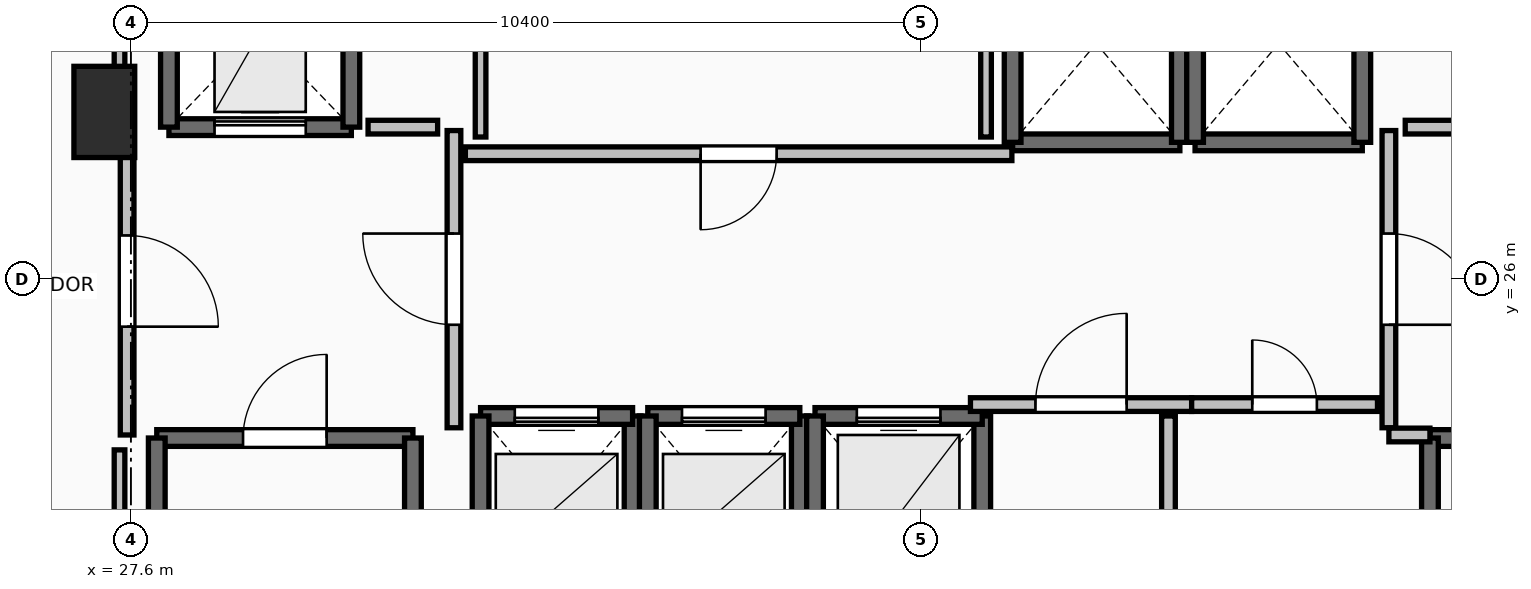
"""IFC4 building model, lengths in metres.
Left out: names, types, materials, properties, quantities, classifications, styles, units other than length and angle.
Written with IfcOpenShell. Run it as: python <this file> out.ifc"""

import sys

from ifc_helpers import new_model, si_unit, direction, frame, frame_2d, origin, origin_2d, place, context, subcontext, project, spatial, rectangle, extrude, element, fill, save


model = new_model("IFC4")
c1 = context("Model", 3, precision=1e-05, world=origin(), true_north=direction((0.0, 1.0)))
c2 = subcontext(c1, "Body", "Model", "MODEL_VIEW")
j1 = project(units=[si_unit("LENGTHUNIT", "METRE"), si_unit("PLANEANGLEUNIT", "RADIAN")], contexts=[c1])
p1 = place(None, origin())
s1 = spatial("IfcSite", under=j1, at=p1, CompositionType="ELEMENT")
p2 = place(p1, origin())
s2 = spatial("IfcBuilding", under=s1, at=p2, CompositionType="ELEMENT")
p3 = place(p2, frame((0.0, 0.0, 164.1)))
s3 = spatial("IfcBuildingStorey", under=s2, at=p3, CompositionType="ELEMENT", Elevation=164.1)
p4 = place(p3, frame((27.25, 28.2, 0.0), z_axis=(0.0, 0.0, 1.0), x_axis=(1.0, 0.0, 0.0)))
e1 = element("IfcColumn", 1, at=p4, inside=s3, PredefinedType="PILASTER", context=c2, shape_type="SweptSolid", body=[
    extrude(rectangle(XDim=0.8, YDim=1.2, at=origin_2d()), origin(), (0.0, 0.0, 1.0), 3.5),
])
p5 = place(p3, frame((27.94, 23.91, 0.0), z_axis=(0.0, 0.0, 1.0), x_axis=(1.0, 0.0, 0.0)))
e2 = element("IfcWall", 2, at=p5, inside=s3, PredefinedType="SOLIDWALL", context=c2, shape_type="SweptSolid", body=[
    extrude(rectangle(XDim=3.37, YDim=0.22, at=frame_2d((1.685, 0.0))), origin(), (0.0, 0.0, 1.0), 3.24),
])
p6 = place(p5, frame((1.135, 0.0, 0.0)))
e3 = element("IfcOpeningElement", 3, at=p6, cuts=e2, PredefinedType="OPENING", context=c2, shape_type="SweptSolid", body=[
    extrude(rectangle(XDim=1.1, YDim=2.15, at=frame_2d((0.55, 1.075))), frame((0.0, 0.125, 0.0), z_axis=(0.0, -1.0, 0.0), x_axis=(1.0, 0.0, 0.0)), (0.0, 0.0, 1.0), 0.25),
])
for number, where, z_axis, x_axis in (
    (4, (31.31, 23.91, 0.0), (0.0, 0.0, 1.0), (0.0, -1.0, 0.0)),
    (5, (27.94, 16.49, 0.0), (0.0, 0.0, 1.0), (0.0, 1.0, 0.0)),
):
    element("IfcWall", number, at=place(p3, frame(where, z_axis=z_axis, x_axis=x_axis)), inside=s3, PredefinedType="SOLIDWALL", context=c2, shape_type="SweptSolid", body=[
        extrude(rectangle(XDim=7.42, YDim=0.22, at=frame_2d((3.71, 0.0))), origin(), (0.0, 0.0, 1.0), 3.24),
    ])
p7 = place(p3, frame((44.69, 23.91, 0.0), z_axis=(0.0, 0.0, 1.0), x_axis=(1.0, 0.0, 0.0)))
e6 = element("IfcWall", 6, at=p7, inside=s3, PredefinedType="SOLIDWALL", context=c2, shape_type="SweptSolid", body=[
    extrude(rectangle(XDim=3.37, YDim=0.22, at=frame_2d((1.685, 0.0))), origin(), (0.0, 0.0, 1.0), 3.24),
])
p8 = place(p7, frame((1.135, 0.0, 0.0)))
e7 = element("IfcOpeningElement", 7, at=p8, cuts=e6, PredefinedType="OPENING", context=c2, shape_type="SweptSolid", body=[
    extrude(rectangle(XDim=1.1, YDim=2.15, at=frame_2d((0.55, 1.075))), frame((0.0, 0.125, 0.0), z_axis=(0.0, -1.0, 0.0), x_axis=(1.0, 0.0, 0.0)), (0.0, 0.0, 1.0), 0.25),
])
p9 = place(p3, frame((44.69, 16.49, 0.0), z_axis=(0.0, 0.0, 1.0), x_axis=(0.0, 1.0, 0.0)))
e8 = element("IfcWall", 8, at=p9, inside=s3, PredefinedType="SOLIDWALL", context=c2, shape_type="SweptSolid", body=[
    extrude(rectangle(XDim=7.42, YDim=0.22, at=frame_2d((3.71, 0.0))), origin(), (0.0, 0.0, 1.0), 3.24),
])
p10 = place(p3, frame((34.2, 21.8, 0.0), z_axis=(0.0, 0.0, 1.0), x_axis=(0.0, 1.0, 0.0)))
e9 = element("IfcWall", 9, at=p10, inside=s3, PredefinedType="SOLIDWALL", context=c2, shape_type="SweptSolid", body=[
    extrude(rectangle(XDim=2.4, YDim=0.22, at=frame_2d((1.2, 0.0))), origin(), (0.0, 0.0, 1.0), 3.24),
])
p11 = place(p3, frame((34.2, 24.2, 0.0), z_axis=(0.0, 0.0, 1.0), x_axis=(-1.0, 0.0, 0.0)))
e10 = element("IfcWall", 10, at=p11, inside=s3, PredefinedType="SOLIDWALL", context=c2, shape_type="SweptSolid", body=[
    extrude(rectangle(XDim=2.0, YDim=0.22, at=frame_2d((1.0, 0.0))), origin(), (0.0, 0.0, 1.0), 3.24),
])
p12 = place(p11, frame((0.45, 0.0, 0.0)))
e11 = element("IfcOpeningElement", 11, at=p12, cuts=e10, PredefinedType="OPENING", context=c2, shape_type="SweptSolid", body=[
    extrude(rectangle(XDim=1.1, YDim=2.2, at=frame_2d((0.55, 1.1))), frame((0.0, 0.125, 0.0), z_axis=(0.0, -1.0, 0.0), x_axis=(1.0, 0.0, 0.0)), (0.0, 0.0, 1.0), 0.25),
])
for number, where, z_axis, x_axis in (
    (12, (32.2, 24.2, 0.0), (0.0, 0.0, 1.0), (0.0, -1.0, 0.0)),
    (13, (36.4, 21.8, 0.0), (0.0, 0.0, 1.0), (0.0, 1.0, 0.0)),
):
    element("IfcWall", number, at=place(p3, frame(where, z_axis=z_axis, x_axis=x_axis)), inside=s3, PredefinedType="SOLIDWALL", context=c2, shape_type="SweptSolid", body=[
        extrude(rectangle(XDim=2.4, YDim=0.22, at=frame_2d((1.2, 0.0))), origin(), (0.0, 0.0, 1.0), 3.24),
    ])
p13 = place(p3, frame((36.4, 24.2, 0.0), z_axis=(0.0, 0.0, 1.0), x_axis=(-1.0, 0.0, 0.0)))
e14 = element("IfcWall", 14, at=p13, inside=s3, PredefinedType="SOLIDWALL", context=c2, shape_type="SweptSolid", body=[
    extrude(rectangle(XDim=2.0, YDim=0.22, at=frame_2d((1.0, 0.0))), origin(), (0.0, 0.0, 1.0), 3.24),
])
p14 = place(p13, frame((0.45, 0.0, 0.0)))
e15 = element("IfcOpeningElement", 15, at=p14, cuts=e14, PredefinedType="OPENING", context=c2, shape_type="SweptSolid", body=[
    extrude(rectangle(XDim=1.1, YDim=2.2, at=frame_2d((0.55, 1.1))), frame((0.0, 0.125, 0.0), z_axis=(0.0, -1.0, 0.0), x_axis=(1.0, 0.0, 0.0)), (0.0, 0.0, 1.0), 0.25),
])
p15 = place(p3, frame((34.4, 24.2, 0.0), z_axis=(0.0, 0.0, 1.0), x_axis=(0.0, -1.0, 0.0)))
e16 = element("IfcWall", 16, at=p15, inside=s3, PredefinedType="SOLIDWALL", context=c2, shape_type="SweptSolid", body=[
    extrude(rectangle(XDim=2.4, YDim=0.22, at=frame_2d((1.2, 0.0))), origin(), (0.0, 0.0, 1.0), 3.24),
])
p16 = place(p3, frame((38.8, 21.6, 0.0), z_axis=(0.0, 0.0, 1.0), x_axis=(0.0, 1.0, 0.0)))
e17 = element("IfcWall", 17, at=p16, inside=s3, PredefinedType="SOLIDWALL", context=c2, shape_type="SweptSolid", body=[
    extrude(rectangle(XDim=2.6, YDim=0.22, at=frame_2d((1.3, 0.0))), origin(), (0.0, 0.0, 1.0), 3.24),
])
p17 = place(p3, frame((38.8, 24.2, 0.0), z_axis=(0.0, 0.0, 1.0), x_axis=(-1.0, 0.0, 0.0)))
e18 = element("IfcWall", 18, at=p17, inside=s3, PredefinedType="SOLIDWALL", context=c2, shape_type="SweptSolid", body=[
    extrude(rectangle(XDim=2.2, YDim=0.22, at=frame_2d((1.1, 0.0))), origin(), (0.0, 0.0, 1.0), 3.24),
])
p18 = place(p17, frame((0.55, 0.0, 0.0)))
e19 = element("IfcOpeningElement", 19, at=p18, cuts=e18, PredefinedType="OPENING", context=c2, shape_type="SweptSolid", body=[
    extrude(rectangle(XDim=1.1, YDim=2.2, at=frame_2d((0.55, 1.1))), frame((0.0, 0.125, 0.0), z_axis=(0.0, -1.0, 0.0), x_axis=(1.0, 0.0, 0.0)), (0.0, 0.0, 1.0), 0.25),
])
p19 = place(p3, frame((36.6, 24.2, 0.0), z_axis=(0.0, 0.0, 1.0), x_axis=(0.0, -1.0, 0.0)))
e20 = element("IfcWall", 20, at=p19, inside=s3, PredefinedType="SOLIDWALL", context=c2, shape_type="SweptSolid", body=[
    extrude(rectangle(XDim=2.6, YDim=0.22, at=frame_2d((1.3, 0.0))), origin(), (0.0, 0.0, 1.0), 3.24),
])
p20 = place(p3, frame((39.2, 27.8, 0.0), z_axis=(0.0, 0.0, 1.0), x_axis=(1.0, 0.0, 0.0)))
e21 = element("IfcWall", 21, at=p20, inside=s3, PredefinedType="SOLIDWALL", context=c2, shape_type="SweptSolid", body=[
    extrude(rectangle(XDim=2.2, YDim=0.22, at=frame_2d((1.1, 0.0))), origin(), (0.0, 0.0, 1.0), 3.24),
])
for number, where, z_axis, x_axis in (
    (22, (41.4, 27.8, 0.0), (0.0, 0.0, 1.0), (0.0, 1.0, 0.0)),
    (23, (39.2, 30.4, 0.0), (0.0, 0.0, 1.0), (0.0, -1.0, 0.0)),
):
    element("IfcWall", number, at=place(p3, frame(where, z_axis=z_axis, x_axis=x_axis)), inside=s3, PredefinedType="SOLIDWALL", context=c2, shape_type="SweptSolid", body=[
        extrude(rectangle(XDim=2.6, YDim=0.22, at=frame_2d((1.3, 0.0))), origin(), (0.0, 0.0, 1.0), 3.24),
    ])
p21 = place(p3, frame((41.6, 27.8, 0.0), z_axis=(0.0, 0.0, 1.0), x_axis=(1.0, 0.0, 0.0)))
e24 = element("IfcWall", 24, at=p21, inside=s3, PredefinedType="SOLIDWALL", context=c2, shape_type="SweptSolid", body=[
    extrude(rectangle(XDim=2.2, YDim=0.22, at=frame_2d((1.1, 0.0))), origin(), (0.0, 0.0, 1.0), 3.24),
])
for number, where, z_axis, x_axis in (
    (25, (43.8, 27.8, 0.0), (0.0, 0.0, 1.0), (0.0, 1.0, 0.0)),
    (26, (41.6, 30.4, 0.0), (0.0, 0.0, 1.0), (0.0, -1.0, 0.0)),
):
    element("IfcWall", number, at=place(p3, frame(where, z_axis=z_axis, x_axis=x_axis)), inside=s3, PredefinedType="SOLIDWALL", context=c2, shape_type="SweptSolid", body=[
        extrude(rectangle(XDim=2.6, YDim=0.22, at=frame_2d((1.3, 0.0))), origin(), (0.0, 0.0, 1.0), 3.24),
    ])
p22 = place(p3, frame((28.1, 28.0, 0.0), z_axis=(0.0, 0.0, 1.0), x_axis=(1.0, 0.0, 0.0)))
e27 = element("IfcWall", 27, at=p22, inside=s3, PredefinedType="SHEAR", context=c2, shape_type="SweptSolid", body=[
    extrude(rectangle(XDim=2.4, YDim=0.22, at=frame_2d((1.2, 0.0))), origin(), (0.0, 0.0, 1.0), 3.24),
])
p23 = place(p22, frame((0.6, 0.0, 0.0)))
e28 = element("IfcOpeningElement", 28, at=p23, cuts=e27, PredefinedType="OPENING", context=c2, shape_type="SweptSolid", body=[
    extrude(rectangle(XDim=1.2, YDim=2.2, at=frame_2d((0.6, 1.1))), frame((0.0, 0.125, 0.0), z_axis=(0.0, -1.0, 0.0), x_axis=(1.0, 0.0, 0.0)), (0.0, 0.0, 1.0), 0.25),
])
for number, where, z_axis, x_axis in (
    (29, (30.5, 28.0, 0.0), (0.0, 0.0, 1.0), (0.0, 1.0, 0.0)),
    (30, (28.1, 30.5, 0.0), (0.0, 0.0, 1.0), (0.0, -1.0, 0.0)),
):
    element("IfcWall", number, at=place(p3, frame(where, z_axis=z_axis, x_axis=x_axis)), inside=s3, PredefinedType="SHEAR", context=c2, shape_type="SweptSolid", body=[
        extrude(rectangle(XDim=2.5, YDim=0.22, at=frame_2d((1.25, 0.0))), origin(), (0.0, 0.0, 1.0), 3.24),
    ])
p24 = place(p3, frame((31.85, 24.045, 0.0), z_axis=(0.0, 0.0, 1.0), x_axis=(0.0, 1.0, 0.0)))
e31 = element("IfcWall", 31, at=p24, inside=s3, PredefinedType="PARTITIONING", context=c2, shape_type="SweptSolid", body=[
    extrude(rectangle(XDim=3.91, YDim=0.18, at=frame_2d((1.955, 0.0))), origin(), (0.0, 0.0, 1.0), 3.24),
])
p25 = place(p24, frame((1.355, 0.0, 0.0)))
e32 = element("IfcOpeningElement", 32, at=p25, cuts=e31, PredefinedType="OPENING", context=c2, shape_type="SweptSolid", body=[
    extrude(rectangle(XDim=1.2, YDim=2.15, at=frame_2d((0.6, 1.075))), frame((0.0, 0.105, 0.0), z_axis=(0.0, -1.0, 0.0), x_axis=(1.0, 0.0, 0.0)), (0.0, 0.0, 1.0), 0.21),
])
p26 = place(p3, frame((27.55, 28.0, 0.0), z_axis=(0.0, 0.0, 1.0), x_axis=(0.0, -1.0, 0.0)))
e33 = element("IfcWall", 33, at=p26, inside=s3, PredefinedType="PARTITIONING", context=c2, shape_type="SweptSolid", body=[
    extrude(rectangle(XDim=4.05, YDim=0.18, at=frame_2d((2.025, 0.0))), origin(), (0.0, 0.0, 1.0), 3.24),
])
p27 = place(p26, frame((1.425, 0.0, 0.0)))
e34 = element("IfcOpeningElement", 34, at=p27, cuts=e33, PredefinedType="OPENING", context=c2, shape_type="SweptSolid", body=[
    extrude(rectangle(XDim=1.2, YDim=2.15, at=frame_2d((0.6, 1.075))), frame((0.0, 0.105, 0.0), z_axis=(0.0, -1.0, 0.0), x_axis=(1.0, 0.0, 0.0)), (0.0, 0.0, 1.0), 0.21),
])
p28 = place(p3, frame((44.15, 27.955, 0.0), z_axis=(0.0, 0.0, 1.0), x_axis=(0.0, -1.0, 0.0)))
e35 = element("IfcWall", 35, at=p28, inside=s3, PredefinedType="PARTITIONING", context=c2, shape_type="SweptSolid", body=[
    extrude(rectangle(XDim=3.91, YDim=0.18, at=frame_2d((1.955, 0.0))), origin(), (0.0, 0.0, 1.0), 3.24),
])
p29 = place(p28, frame((1.355, 0.0, 0.0)))
e36 = element("IfcOpeningElement", 36, at=p29, cuts=e35, PredefinedType="OPENING", context=c2, shape_type="SweptSolid", body=[
    extrude(rectangle(XDim=1.2, YDim=2.15, at=frame_2d((0.6, 1.075))), frame((0.0, 0.105, 0.0), z_axis=(0.0, -1.0, 0.0), x_axis=(1.0, 0.0, 0.0)), (0.0, 0.0, 1.0), 0.21),
])
p30 = place(p3, frame((44.15, 23.95, 0.0), z_axis=(0.0, 0.0, 1.0), x_axis=(1.0, 0.0, 0.0)))
e37 = element("IfcWall", 37, at=p30, inside=s3, PredefinedType="PARTITIONING", context=c2, shape_type="SweptSolid", body=[
    extrude(rectangle(XDim=0.54, YDim=0.18, at=frame_2d((0.27, 0.0))), origin(), (0.0, 0.0, 1.0), 3.24),
])
p31 = place(p3, frame((38.645, 24.35, 0.0), z_axis=(0.0, 0.0, 1.0), x_axis=(1.0, 0.0, 0.0)))
e38 = element("IfcWall", 38, at=p31, inside=s3, PredefinedType="PARTITIONING", context=c2, shape_type="SweptSolid", body=[
    extrude(rectangle(XDim=2.91, YDim=0.18, at=frame_2d((1.455, 0.0))), origin(), (0.0, 0.0, 1.0), 3.24),
])
p32 = place(p31, frame((0.855, 0.0, 0.0)))
e39 = element("IfcOpeningElement", 39, at=p32, cuts=e38, PredefinedType="OPENING", context=c2, shape_type="SweptSolid", body=[
    extrude(rectangle(XDim=1.2, YDim=2.15, at=frame_2d((0.6, 1.075))), frame((0.0, 0.105, 0.0), z_axis=(0.0, -1.0, 0.0), x_axis=(1.0, 0.0, 0.0)), (0.0, 0.0, 1.0), 0.21),
])
p33 = place(p3, frame((41.555, 24.35, 0.0), z_axis=(0.0, 0.0, 1.0), x_axis=(1.0, 0.0, 0.0)))
e40 = element("IfcWall", 40, at=p33, inside=s3, PredefinedType="PARTITIONING", context=c2, shape_type="SweptSolid", body=[
    extrude(rectangle(XDim=2.445, YDim=0.18, at=frame_2d((1.223, 0.0))), origin(), (0.0, 0.0, 1.0), 3.24),
])
p34 = place(p33, frame((0.798, 0.0, 0.0)))
e41 = element("IfcOpeningElement", 41, at=p34, cuts=e40, PredefinedType="OPENING", context=c2, shape_type="SweptSolid", body=[
    extrude(rectangle(XDim=0.85, YDim=2.1, at=frame_2d((0.425, 1.05))), frame((0.0, 0.105, 0.0), z_axis=(0.0, -1.0, 0.0), x_axis=(1.0, 0.0, 0.0)), (0.0, 0.0, 1.0), 0.21),
])
p35 = place(p3, frame((39.19, 27.65, 0.0), z_axis=(0.0, 0.0, 1.0), x_axis=(-1.0, 0.0, 0.0)))
e42 = element("IfcWall", 42, at=p35, inside=s3, PredefinedType="PARTITIONING", context=c2, shape_type="SweptSolid", body=[
    extrude(rectangle(XDim=7.19, YDim=0.18, at=frame_2d((3.595, 0.0))), origin(), (0.0, 0.0, 1.0), 3.24),
])
p36 = place(p35, frame((3.095, 0.0, 0.0)))
e43 = element("IfcOpeningElement", 43, at=p36, cuts=e42, PredefinedType="OPENING", context=c2, shape_type="SweptSolid", body=[
    extrude(rectangle(XDim=1.0, YDim=2.15, at=frame_2d((0.5, 1.075))), frame((0.0, 0.105, 0.0), z_axis=(0.0, -1.0, 0.0), x_axis=(1.0, 0.0, 0.0)), (0.0, 0.0, 1.0), 0.21),
])
p37 = place(p3, frame((41.25, 20.305, 0.0), z_axis=(0.0, 0.0, 1.0), x_axis=(0.0, 1.0, 0.0)))
e44 = element("IfcWall", 44, at=p37, inside=s3, PredefinedType="PARTITIONING", context=c2, shape_type="SweptSolid", body=[
    extrude(rectangle(XDim=3.895, YDim=0.18, at=frame_2d((1.948, 0.0))), origin(), (0.0, 0.0, 1.0), 3.24),
])
p38 = place(p37, frame((1.522, 0.0, 0.0)))
e45 = element("IfcOpeningElement", 45, at=p38, cuts=e44, PredefinedType="OPENING", context=c2, shape_type="SweptSolid", body=[
    extrude(rectangle(XDim=0.85, YDim=2.1, at=frame_2d((0.425, 1.05))), frame((0.0, 0.105, 0.0), z_axis=(0.0, -1.0, 0.0), x_axis=(1.0, 0.0, 0.0)), (0.0, 0.0, 1.0), 0.21),
])
for number, where, z_axis, x_axis in (
    (46, (31.635, 28.0, 0.0), (0.0, 0.0, 1.0), (-1.0, 0.0, 0.0)),
    (47, (45.28, 28.0, 0.0), (0.0, 0.0, 1.0), (-1.0, 0.0, 0.0)),
):
    element("IfcWall", number, at=place(p3, frame(where, z_axis=z_axis, x_axis=x_axis)), inside=s3, PredefinedType="PARTITIONING", context=c2, shape_type="SweptSolid", body=[
        extrude(rectangle(XDim=0.915, YDim=0.18, at=frame_2d((0.458, 0.0))), origin(), (0.0, 0.0, 1.0), 3.24),
    ])
for number, where, z_axis, x_axis in (
    (48, (32.2, 30.26, 0.0), (0.0, 0.0, 1.0), (0.0, -1.0, 0.0)),
    (49, (38.85, 27.87, 0.0), (0.0, 0.0, 1.0), (0.0, 1.0, 0.0)),
):
    element("IfcWall", number, at=place(p3, frame(where, z_axis=z_axis, x_axis=x_axis)), inside=s3, PredefinedType="PARTITIONING", context=c2, shape_type="SweptSolid", body=[
        extrude(rectangle(XDim=2.39, YDim=0.14, at=frame_2d((1.195, 0.0))), origin(), (0.0, 0.0, 1.0), 3.24),
    ])
p39 = place(p3, frame((27.45, 33.45, 0.0), z_axis=(0.0, 0.0, 1.0), x_axis=(0.0, -1.0, 0.0)))
e50 = element("IfcWall", 50, at=p39, inside=s3, PredefinedType="PARTITIONING", context=c2, shape_type="SweptSolid", body=[
    extrude(rectangle(XDim=5.254, YDim=0.14, at=frame_2d((2.627, 0.0))), origin(), (0.0, 0.0, 1.0), 2.432),
])
p40 = place(p3, frame((27.45, 23.754, 0.0), z_axis=(0.0, 0.0, 1.0), x_axis=(0.0, -1.0, 0.0)))
e51 = element("IfcWall", 51, at=p40, inside=s3, PredefinedType="PARTITIONING", context=c2, shape_type="SweptSolid", body=[
    extrude(rectangle(XDim=7.514, YDim=0.14, at=frame_2d((3.757, 0.0))), origin(), (0.0, 0.0, 1.0), 2.432),
])
p41 = place(p6, origin())
e52 = element("IfcDoor", 52, at=p41, inside=s3, OperationType="SINGLE_SWING_RIGHT", PredefinedType="DOOR", context=c2, shape_type="SweptSolid", body=[
    extrude(rectangle(XDim=1.1, YDim=2.15, at=frame_2d((0.55, 1.075))), frame((0.0, 0.025, 0.0), z_axis=(0.0, -1.0, 0.0), x_axis=(1.0, 0.0, 0.0)), (0.0, 0.0, 1.0), 0.05),
])
fill(e3, e52)
p42 = place(p12, origin())
e53 = element("IfcDoor", 53, at=p42, inside=s3, OperationType="SLIDING_TO_LEFT", PredefinedType="DOOR", context=c2, shape_type="SweptSolid", body=[
    extrude(rectangle(XDim=1.1, YDim=2.2, at=frame_2d((0.55, 1.1))), frame((0.0, 0.025, 0.0), z_axis=(0.0, -1.0, 0.0), x_axis=(1.0, 0.0, 0.0)), (0.0, 0.0, 1.0), 0.05),
])
fill(e11, e53)
p43 = place(p14, origin())
e54 = element("IfcDoor", 54, at=p43, inside=s3, OperationType="SLIDING_TO_LEFT", PredefinedType="DOOR", context=c2, shape_type="SweptSolid", body=[
    extrude(rectangle(XDim=1.1, YDim=2.2, at=frame_2d((0.55, 1.1))), frame((0.0, 0.025, 0.0), z_axis=(0.0, -1.0, 0.0), x_axis=(1.0, 0.0, 0.0)), (0.0, 0.0, 1.0), 0.05),
])
fill(e15, e54)
p44 = place(p18, origin())
e55 = element("IfcDoor", 55, at=p44, inside=s3, OperationType="SLIDING_TO_LEFT", PredefinedType="DOOR", context=c2, shape_type="SweptSolid", body=[
    extrude(rectangle(XDim=1.1, YDim=2.2, at=frame_2d((0.55, 1.1))), frame((0.0, 0.025, 0.0), z_axis=(0.0, -1.0, 0.0), x_axis=(1.0, 0.0, 0.0)), (0.0, 0.0, 1.0), 0.05),
])
fill(e19, e55)
p45 = place(p23, origin())
e56 = element("IfcDoor", 56, at=p45, inside=s3, OperationType="SLIDING_TO_LEFT", PredefinedType="DOOR", context=c2, shape_type="SweptSolid", body=[
    extrude(rectangle(XDim=1.2, YDim=2.2, at=frame_2d((0.6, 1.1))), frame((0.0, 0.025, 0.0), z_axis=(0.0, -1.0, 0.0), x_axis=(1.0, 0.0, 0.0)), (0.0, 0.0, 1.0), 0.05),
])
fill(e28, e56)
p46 = place(p25, origin())
e57 = element("IfcDoor", 57, at=p46, inside=s3, OperationType="SINGLE_SWING_RIGHT", PredefinedType="DOOR", context=c2, shape_type="SweptSolid", body=[
    extrude(rectangle(XDim=1.2, YDim=2.15, at=frame_2d((0.6, 1.075))), frame((0.0, 0.025, 0.0), z_axis=(0.0, -1.0, 0.0), x_axis=(1.0, 0.0, 0.0)), (0.0, 0.0, 1.0), 0.05),
])
fill(e32, e57)
p47 = place(p27, origin())
e58 = element("IfcDoor", 58, at=p47, inside=s3, OperationType="SINGLE_SWING_RIGHT", PredefinedType="DOOR", context=c2, shape_type="SweptSolid", body=[
    extrude(rectangle(XDim=1.2, YDim=2.15, at=frame_2d((0.6, 1.075))), frame((0.0, 0.025, 0.0), z_axis=(0.0, -1.0, 0.0), x_axis=(1.0, 0.0, 0.0)), (0.0, 0.0, 1.0), 0.05),
])
fill(e34, e58)
p48 = place(p29, origin())
e59 = element("IfcDoor", 59, at=p48, inside=s3, OperationType="SINGLE_SWING_RIGHT", PredefinedType="DOOR", context=c2, shape_type="SweptSolid", body=[
    extrude(rectangle(XDim=1.2, YDim=2.15, at=frame_2d((0.6, 1.075))), frame((0.0, 0.025, 0.0), z_axis=(0.0, -1.0, 0.0), x_axis=(1.0, 0.0, 0.0)), (0.0, 0.0, 1.0), 0.05),
])
fill(e36, e59)
p49 = place(p32, origin())
e60 = element("IfcDoor", 60, at=p49, inside=s3, OperationType="SINGLE_SWING_RIGHT", PredefinedType="DOOR", context=c2, shape_type="SweptSolid", body=[
    extrude(rectangle(XDim=1.2, YDim=2.15, at=frame_2d((0.6, 1.075))), frame((0.0, 0.025, 0.0), z_axis=(0.0, -1.0, 0.0), x_axis=(1.0, 0.0, 0.0)), (0.0, 0.0, 1.0), 0.05),
])
fill(e39, e60)
p50 = place(p34, origin())
e61 = element("IfcDoor", 61, at=p50, inside=s3, OperationType="SINGLE_SWING_LEFT", PredefinedType="DOOR", context=c2, shape_type="SweptSolid", body=[
    extrude(rectangle(XDim=0.85, YDim=2.1, at=frame_2d((0.425, 1.05))), frame((0.0, 0.025, 0.0), z_axis=(0.0, -1.0, 0.0), x_axis=(1.0, 0.0, 0.0)), (0.0, 0.0, 1.0), 0.05),
])
fill(e41, e61)
p51 = place(p36, origin())
e62 = element("IfcDoor", 62, at=p51, inside=s3, OperationType="SINGLE_SWING_RIGHT", PredefinedType="DOOR", context=c2, shape_type="SweptSolid", body=[
    extrude(rectangle(XDim=1.0, YDim=2.15, at=frame_2d((0.5, 1.075))), frame((0.0, 0.025, 0.0), z_axis=(0.0, -1.0, 0.0), x_axis=(1.0, 0.0, 0.0)), (0.0, 0.0, 1.0), 0.05),
])
fill(e43, e62)
save(model, sys.argv[1])
